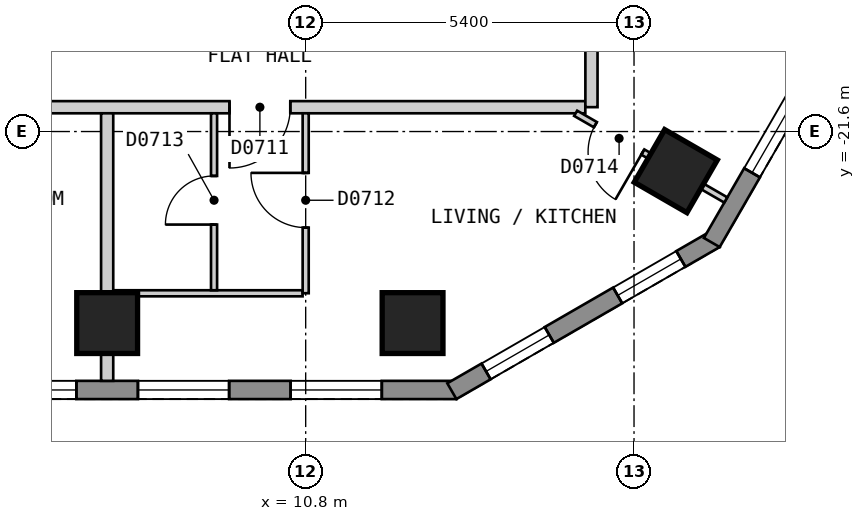
"""IFC4 building model, lengths in metres.
Left out: names, types, materials, properties, quantities, classifications, styles, units other than length and angle.
Written with IfcOpenShell. Run it as: python <this file> out.ifc"""

import sys

from ifc_helpers import new_model, si_unit, direction, frame, frame_2d, origin, origin_2d, place, context, subcontext, project, spatial, polyline, rectangle, outline, extrude, element, fill, save


model = new_model("IFC4")
c1 = context("Model", 3, precision=1e-05, world=origin(), true_north=direction((0.0, 1.0)))
c2 = subcontext(c1, "Body", "Model", "MODEL_VIEW")
j1 = project(units=[si_unit("LENGTHUNIT", "METRE"), si_unit("PLANEANGLEUNIT", "RADIAN")], contexts=[c1])
p1 = place(None, origin())
s1 = spatial("IfcSite", under=j1, at=p1, CompositionType="ELEMENT")
p2 = place(p1, origin())
s2 = spatial("IfcBuilding", under=s1, at=p2, CompositionType="ELEMENT")
p3 = place(p2, frame((0.0, 0.0, 93.0)))
s3 = spatial("IfcBuildingStorey", under=s2, at=p3, CompositionType="ELEMENT", Elevation=93.0)
for number, where, z_axis, x_axis in (
    (1, (7.535, -24.75, 0.0), (0.0, 0.0, 1.0), (1.0, 0.0, 0.0)),
    (2, (12.558, -24.75, 0.0), (0.0, 0.0, 1.0), (1.0, 0.0, 0.0)),
    (3, (16.887, -22.251, 0.0), (0.0, 0.0, 1.0), (0.5, 0.866, 0.0)),
):
    element("IfcColumn", number, at=place(p3, frame(where, z_axis=z_axis, x_axis=x_axis)), inside=s3, PredefinedType="COLUMN", context=c2, shape_type="SweptSolid", body=[
        extrude(rectangle(XDim=1.0, YDim=1.0, at=origin_2d()), origin(), (0.0, 0.0, 1.0), 3.0),
    ])
p4 = place(p3, frame((-13.279, -25.85, 0.0), z_axis=(0.0, 0.0, 1.0), x_axis=(1.0, 0.0, 0.0)))
e4 = element("IfcWall", 4, at=p4, inside=s3, PredefinedType="SOLIDWALL", context=c2, shape_type="SweptSolid", body=[
    extrude(outline(polyline([(0.0, -0.15), (26.558, -0.15), (26.478, 0.15), (0.08, 0.15), (0.0, -0.15)])), origin(), (0.0, 0.0, 1.0), 2.7),
])
p5 = place(p4, frame((1.228, 0.0, 0.15)))
e5 = element("IfcOpeningElement", 5, at=p5, cuts=e4, PredefinedType="OPENING", context=c2, shape_type="SweptSolid", body=[
    extrude(rectangle(XDim=1.5, YDim=2.1, at=frame_2d((0.75, 1.05))), frame((0.0, 0.16, 0.0), z_axis=(0.0, -1.0, 0.0), x_axis=(1.0, 0.0, 0.0)), (0.0, 0.0, 1.0), 0.32),
])
p6 = place(p4, frame((3.739, 0.0, 0.15)))
e6 = element("IfcOpeningElement", 6, at=p6, cuts=e4, PredefinedType="OPENING", context=c2, shape_type="SweptSolid", body=[
    extrude(rectangle(XDim=1.5, YDim=2.1, at=frame_2d((0.75, 1.05))), frame((0.0, 0.16, 0.0), z_axis=(0.0, -1.0, 0.0), x_axis=(1.0, 0.0, 0.0)), (0.0, 0.0, 1.0), 0.32),
])
p7 = place(p4, frame((6.251, 0.0, 0.15)))
e7 = element("IfcOpeningElement", 7, at=p7, cuts=e4, PredefinedType="OPENING", context=c2, shape_type="SweptSolid", body=[
    extrude(rectangle(XDim=1.5, YDim=2.1, at=frame_2d((0.75, 1.05))), frame((0.0, 0.16, 0.0), z_axis=(0.0, -1.0, 0.0), x_axis=(1.0, 0.0, 0.0)), (0.0, 0.0, 1.0), 0.32),
])
p8 = place(p4, frame((8.762, 0.0, 0.15)))
e8 = element("IfcOpeningElement", 8, at=p8, cuts=e4, PredefinedType="OPENING", context=c2, shape_type="SweptSolid", body=[
    extrude(rectangle(XDim=1.5, YDim=2.1, at=frame_2d((0.75, 1.05))), frame((0.0, 0.16, 0.0), z_axis=(0.0, -1.0, 0.0), x_axis=(1.0, 0.0, 0.0)), (0.0, 0.0, 1.0), 0.32),
])
p9 = place(p4, frame((11.274, 0.0, 0.15)))
e9 = element("IfcOpeningElement", 9, at=p9, cuts=e4, PredefinedType="OPENING", context=c2, shape_type="SweptSolid", body=[
    extrude(rectangle(XDim=1.5, YDim=2.1, at=frame_2d((0.75, 1.05))), frame((0.0, 0.16, 0.0), z_axis=(0.0, -1.0, 0.0), x_axis=(1.0, 0.0, 0.0)), (0.0, 0.0, 1.0), 0.32),
])
p10 = place(p4, frame((13.785, 0.0, 0.15)))
e10 = element("IfcOpeningElement", 10, at=p10, cuts=e4, PredefinedType="OPENING", context=c2, shape_type="SweptSolid", body=[
    extrude(rectangle(XDim=1.5, YDim=2.1, at=frame_2d((0.75, 1.05))), frame((0.0, 0.16, 0.0), z_axis=(0.0, -1.0, 0.0), x_axis=(1.0, 0.0, 0.0)), (0.0, 0.0, 1.0), 0.32),
])
p11 = place(p4, frame((16.297, 0.0, 0.15)))
e11 = element("IfcOpeningElement", 11, at=p11, cuts=e4, PredefinedType="OPENING", context=c2, shape_type="SweptSolid", body=[
    extrude(rectangle(XDim=1.5, YDim=2.1, at=frame_2d((0.75, 1.05))), frame((0.0, 0.16, 0.0), z_axis=(0.0, -1.0, 0.0), x_axis=(1.0, 0.0, 0.0)), (0.0, 0.0, 1.0), 0.32),
])
p12 = place(p4, frame((18.808, 0.0, 0.15)))
e12 = element("IfcOpeningElement", 12, at=p12, cuts=e4, PredefinedType="OPENING", context=c2, shape_type="SweptSolid", body=[
    extrude(rectangle(XDim=1.5, YDim=2.1, at=frame_2d((0.75, 1.05))), frame((0.0, 0.16, 0.0), z_axis=(0.0, -1.0, 0.0), x_axis=(1.0, 0.0, 0.0)), (0.0, 0.0, 1.0), 0.32),
])
p13 = place(p4, frame((21.32, 0.0, 0.15)))
e13 = element("IfcOpeningElement", 13, at=p13, cuts=e4, PredefinedType="OPENING", context=c2, shape_type="SweptSolid", body=[
    extrude(rectangle(XDim=1.5, YDim=2.1, at=frame_2d((0.75, 1.05))), frame((0.0, 0.16, 0.0), z_axis=(0.0, -1.0, 0.0), x_axis=(1.0, 0.0, 0.0)), (0.0, 0.0, 1.0), 0.32),
])
p14 = place(p4, frame((23.831, 0.0, 0.15)))
e14 = element("IfcOpeningElement", 14, at=p14, cuts=e4, PredefinedType="OPENING", context=c2, shape_type="SweptSolid", body=[
    extrude(rectangle(XDim=1.5, YDim=2.1, at=frame_2d((0.75, 1.05))), frame((0.0, 0.16, 0.0), z_axis=(0.0, -1.0, 0.0), x_axis=(1.0, 0.0, 0.0)), (0.0, 0.0, 1.0), 0.32),
])
p15 = place(p3, frame((13.204, -25.87, 0.0), z_axis=(0.0, 0.0, 1.0), x_axis=(0.866010750942, 0.50002537861, 0.0)))
e15 = element("IfcWall", 15, at=p15, inside=s3, PredefinedType="SOLIDWALL", context=c2, shape_type="SweptSolid", body=[
    extrude(outline(polyline([(0.0, -0.15), (5.0, -0.15), (4.919, 0.15), (0.08, 0.15), (0.0, -0.15)])), origin(), (0.0, 0.0, 1.0), 2.7),
])
p16 = place(p15, frame((0.65, 0.0, 0.15)))
e16 = element("IfcOpeningElement", 16, at=p16, cuts=e15, PredefinedType="OPENING", context=c2, shape_type="SweptSolid", body=[
    extrude(rectangle(XDim=1.2, YDim=2.1, at=frame_2d((0.6, 1.05))), frame((0.0, 0.16, 0.0), z_axis=(0.0, -1.0, 0.0), x_axis=(1.0, 0.0, 0.0)), (0.0, 0.0, 1.0), 0.32),
])
p17 = place(p15, frame((3.149, 0.0, 0.15)))
e17 = element("IfcOpeningElement", 17, at=p17, cuts=e15, PredefinedType="OPENING", context=c2, shape_type="SweptSolid", body=[
    extrude(rectangle(XDim=1.2, YDim=2.1, at=frame_2d((0.6, 1.05))), frame((0.0, 0.16, 0.0), z_axis=(0.0, -1.0, 0.0), x_axis=(1.0, 0.0, 0.0)), (0.0, 0.0, 1.0), 0.32),
])
p18 = place(p3, frame((17.479, -23.425, 0.0), z_axis=(0.0, 0.0, 1.0), x_axis=(0.500035407905, 0.866004960056, 0.0)))
e18 = element("IfcWall", 18, at=p18, inside=s3, PredefinedType="SOLIDWALL", context=c2, shape_type="SweptSolid", body=[
    extrude(outline(polyline([(0.0, -0.15), (23.094, -0.15), (23.014, 0.15), (0.08, 0.15), (0.0, -0.15)])), origin(), (0.0, 0.0, 1.0), 2.7),
])
p19 = place(p18, frame((1.324, 0.0, 0.15)))
e19 = element("IfcOpeningElement", 19, at=p19, cuts=e18, PredefinedType="OPENING", context=c2, shape_type="SweptSolid", body=[
    extrude(rectangle(XDim=1.5, YDim=2.1, at=frame_2d((0.75, 1.05))), frame((0.0, 0.16, 0.0), z_axis=(0.0, -1.0, 0.0), x_axis=(1.0, 0.0, 0.0)), (0.0, 0.0, 1.0), 0.32),
])
p20 = place(p18, frame((4.031, 0.0, 0.15)))
e20 = element("IfcOpeningElement", 20, at=p20, cuts=e18, PredefinedType="OPENING", context=c2, shape_type="SweptSolid", body=[
    extrude(rectangle(XDim=1.5, YDim=2.1, at=frame_2d((0.75, 1.05))), frame((0.0, 0.16, 0.0), z_axis=(0.0, -1.0, 0.0), x_axis=(1.0, 0.0, 0.0)), (0.0, 0.0, 1.0), 0.32),
])
p21 = place(p18, frame((6.737, 0.0, 0.15)))
e21 = element("IfcOpeningElement", 21, at=p21, cuts=e18, PredefinedType="OPENING", context=c2, shape_type="SweptSolid", body=[
    extrude(rectangle(XDim=1.5, YDim=2.1, at=frame_2d((0.75, 1.05))), frame((0.0, 0.16, 0.0), z_axis=(0.0, -1.0, 0.0), x_axis=(1.0, 0.0, 0.0)), (0.0, 0.0, 1.0), 0.32),
])
p22 = place(p18, frame((9.444, 0.0, 0.15)))
e22 = element("IfcOpeningElement", 22, at=p22, cuts=e18, PredefinedType="OPENING", context=c2, shape_type="SweptSolid", body=[
    extrude(rectangle(XDim=1.5, YDim=2.1, at=frame_2d((0.75, 1.05))), frame((0.0, 0.16, 0.0), z_axis=(0.0, -1.0, 0.0), x_axis=(1.0, 0.0, 0.0)), (0.0, 0.0, 1.0), 0.32),
])
p23 = place(p18, frame((12.151, 0.0, 0.15)))
e23 = element("IfcOpeningElement", 23, at=p23, cuts=e18, PredefinedType="OPENING", context=c2, shape_type="SweptSolid", body=[
    extrude(rectangle(XDim=1.5, YDim=2.1, at=frame_2d((0.75, 1.05))), frame((0.0, 0.16, 0.0), z_axis=(0.0, -1.0, 0.0), x_axis=(1.0, 0.0, 0.0)), (0.0, 0.0, 1.0), 0.32),
])
p24 = place(p18, frame((14.857, 0.0, 0.15)))
e24 = element("IfcOpeningElement", 24, at=p24, cuts=e18, PredefinedType="OPENING", context=c2, shape_type="SweptSolid", body=[
    extrude(rectangle(XDim=1.5, YDim=2.1, at=frame_2d((0.75, 1.05))), frame((0.0, 0.16, 0.0), z_axis=(0.0, -1.0, 0.0), x_axis=(1.0, 0.0, 0.0)), (0.0, 0.0, 1.0), 0.32),
])
p25 = place(p18, frame((17.564, 0.0, 0.15)))
e25 = element("IfcOpeningElement", 25, at=p25, cuts=e18, PredefinedType="OPENING", context=c2, shape_type="SweptSolid", body=[
    extrude(rectangle(XDim=1.5, YDim=2.1, at=frame_2d((0.75, 1.05))), frame((0.0, 0.16, 0.0), z_axis=(0.0, -1.0, 0.0), x_axis=(1.0, 0.0, 0.0)), (0.0, 0.0, 1.0), 0.32),
])
p26 = place(p18, frame((20.271, 0.0, 0.15)))
e26 = element("IfcOpeningElement", 26, at=p26, cuts=e18, PredefinedType="OPENING", context=c2, shape_type="SweptSolid", body=[
    extrude(rectangle(XDim=1.5, YDim=2.1, at=frame_2d((0.75, 1.05))), frame((0.0, 0.16, 0.0), z_axis=(0.0, -1.0, 0.0), x_axis=(1.0, 0.0, 0.0)), (0.0, 0.0, 1.0), 0.32),
])
p27 = place(p3, frame((-15.499, -21.2, 0.0), z_axis=(0.0, 0.0, 1.0), x_axis=(1.0, 0.0, 0.0)))
e27 = element("IfcWall", 27, at=p27, inside=s3, PredefinedType="PARTITIONING", context=c2, shape_type="SweptSolid", body=[
    extrude(rectangle(XDim=30.898, YDim=0.2, at=frame_2d((15.449, 0.0))), origin(), (0.0, 0.0, 1.0), 2.7),
])
p28 = place(p27, frame((9.977, 0.0, 0.0)))
e28 = element("IfcOpeningElement", 28, at=p28, cuts=e27, PredefinedType="OPENING", context=c2, shape_type="SweptSolid", body=[
    extrude(rectangle(XDim=1.0, YDim=2.1, at=frame_2d((0.5, 1.05))), frame((0.0, 0.11, 0.0), z_axis=(0.0, -1.0, 0.0), x_axis=(1.0, 0.0, 0.0)), (0.0, 0.0, 1.0), 0.22),
])
p29 = place(p27, frame((25.046, 0.0, 0.0)))
e29 = element("IfcOpeningElement", 29, at=p29, cuts=e27, PredefinedType="OPENING", context=c2, shape_type="SweptSolid", body=[
    extrude(rectangle(XDim=1.0, YDim=2.1, at=frame_2d((0.5, 1.05))), frame((0.0, 0.11, 0.0), z_axis=(0.0, -1.0, 0.0), x_axis=(1.0, 0.0, 0.0)), (0.0, 0.0, 1.0), 0.22),
])
p30 = place(p3, frame((15.5, -21.199, 0.0), z_axis=(0.0, 0.0, 1.0), x_axis=(0.0, 1.0, 0.0)))
e30 = element("IfcWall", 30, at=p30, inside=s3, PredefinedType="PARTITIONING", context=c2, shape_type="SweptSolid", body=[
    extrude(rectangle(XDim=10.483, YDim=0.2, at=frame_2d((5.241, 0.0))), origin(), (0.0, 0.0, 1.0), 2.7),
])
p31 = place(p3, frame((15.24, -21.3, 0.0), z_axis=(0.0, 0.0, 1.0), x_axis=(0.866090043625, -0.499888023795, 0.0)))
e31 = element("IfcWall", 31, at=p31, inside=s3, PredefinedType="PARTITIONING", context=c2, shape_type="SweptSolid", body=[
    extrude(rectangle(XDim=2.851, YDim=0.1, at=frame_2d((1.425, 0.0))), origin(), (0.0, 0.0, 1.0), 2.7),
])
p32 = place(p31, frame((0.375, 0.0, 0.0)))
e32 = element("IfcOpeningElement", 32, at=p32, cuts=e31, PredefinedType="OPENING", context=c2, shape_type="SweptSolid", body=[
    extrude(rectangle(XDim=0.9, YDim=2.1, at=frame_2d((0.45, 1.05))), frame((0.0, 0.06, 0.0), z_axis=(0.0, -1.0, 0.0), x_axis=(1.0, 0.0, 0.0)), (0.0, 0.0, 1.0), 0.12),
])
p33 = place(p3, frame((7.635, -24.26, 0.0), z_axis=(0.0, 0.0, 1.0), x_axis=(1.0, 0.0, 0.0)))
e33 = element("IfcWall", 33, at=p33, inside=s3, PredefinedType="PARTITIONING", context=c2, shape_type="SweptSolid", body=[
    extrude(rectangle(XDim=3.114, YDim=0.1, at=frame_2d((1.557, 0.0))), origin(), (0.0, 0.0, 1.0), 2.7),
])
p34 = place(p3, frame((9.293, -24.21, 0.0), z_axis=(0.0, 0.0, 1.0), x_axis=(0.0, 1.0, 0.0)))
e34 = element("IfcWall", 34, at=p34, inside=s3, PredefinedType="PARTITIONING", context=c2, shape_type="SweptSolid", body=[
    extrude(rectangle(XDim=2.91, YDim=0.1, at=frame_2d((1.455, 0.0))), origin(), (0.0, 0.0, 1.0), 2.7),
])
p35 = place(p34, frame((1.08, 0.0, 0.0)))
e35 = element("IfcOpeningElement", 35, at=p35, cuts=e34, PredefinedType="OPENING", context=c2, shape_type="SweptSolid", body=[
    extrude(rectangle(XDim=0.8, YDim=2.1, at=frame_2d((0.4, 1.05))), frame((0.0, 0.06, 0.0), z_axis=(0.0, -1.0, 0.0), x_axis=(1.0, 0.0, 0.0)), (0.0, 0.0, 1.0), 0.12),
])
p36 = place(p3, frame((10.8, -24.259, 0.0), z_axis=(0.0, 0.0, 1.0), x_axis=(0.0, 1.0, 0.0)))
e36 = element("IfcWall", 36, at=p36, inside=s3, PredefinedType="PARTITIONING", context=c2, shape_type="SweptSolid", body=[
    extrude(rectangle(XDim=2.959, YDim=0.1, at=frame_2d((1.479, 0.0))), origin(), (0.0, 0.0, 1.0), 2.7),
])
p37 = place(p36, frame((1.079, 0.0, 0.0)))
e37 = element("IfcOpeningElement", 37, at=p37, cuts=e36, PredefinedType="OPENING", context=c2, shape_type="SweptSolid", body=[
    extrude(rectangle(XDim=0.9, YDim=2.1, at=frame_2d((0.45, 1.05))), frame((0.0, 0.06, 0.0), z_axis=(0.0, -1.0, 0.0), x_axis=(1.0, 0.0, 0.0)), (0.0, 0.0, 1.0), 0.12),
])
p38 = place(p3, frame((7.535, -21.3, 0.0), z_axis=(0.0, 0.0, 1.0), x_axis=(0.0, -1.0, 0.0)))
e38 = element("IfcWall", 38, at=p38, inside=s3, PredefinedType="PARTITIONING", context=c2, shape_type="SweptSolid", body=[
    extrude(rectangle(XDim=2.98, YDim=0.2, at=frame_2d((1.49, 0.0))), origin(), (0.0, 0.0, 1.0), 2.7),
])
p39 = place(p3, frame((7.535, -25.7, 0.0), z_axis=(0.0, 0.0, 1.0), x_axis=(0.0, 1.0, 0.0)))
e39 = element("IfcWall", 39, at=p39, inside=s3, PredefinedType="PARTITIONING", context=c2, shape_type="SweptSolid", body=[
    extrude(rectangle(XDim=1.46, YDim=0.2, at=frame_2d((0.73, 0.0))), origin(), (0.0, 0.0, 1.0), 2.7),
])
p40 = place(p12, origin())
e40 = element("IfcWindow", 40, at=p40, inside=s3, PartitioningType="SINGLE_PANEL", PredefinedType="WINDOW", context=c2, shape_type="SweptSolid", body=[
    extrude(rectangle(XDim=1.5, YDim=2.1, at=frame_2d((0.75, 1.05))), frame((0.0, 0.03, 0.0), z_axis=(0.0, -1.0, 0.0), x_axis=(1.0, 0.0, 0.0)), (0.0, 0.0, 1.0), 0.06),
])
fill(e12, e40)
p41 = place(p13, origin())
e41 = element("IfcWindow", 41, at=p41, inside=s3, PartitioningType="SINGLE_PANEL", PredefinedType="WINDOW", context=c2, shape_type="SweptSolid", body=[
    extrude(rectangle(XDim=1.5, YDim=2.1, at=frame_2d((0.75, 1.05))), frame((0.0, 0.03, 0.0), z_axis=(0.0, -1.0, 0.0), x_axis=(1.0, 0.0, 0.0)), (0.0, 0.0, 1.0), 0.06),
])
fill(e13, e41)
p42 = place(p14, origin())
e42 = element("IfcWindow", 42, at=p42, inside=s3, PartitioningType="SINGLE_PANEL", PredefinedType="WINDOW", context=c2, shape_type="SweptSolid", body=[
    extrude(rectangle(XDim=1.5, YDim=2.1, at=frame_2d((0.75, 1.05))), frame((0.0, 0.03, 0.0), z_axis=(0.0, -1.0, 0.0), x_axis=(1.0, 0.0, 0.0)), (0.0, 0.0, 1.0), 0.06),
])
fill(e14, e42)
p43 = place(p16, origin())
e43 = element("IfcWindow", 43, at=p43, inside=s3, PartitioningType="SINGLE_PANEL", PredefinedType="WINDOW", context=c2, shape_type="SweptSolid", body=[
    extrude(rectangle(XDim=1.2, YDim=2.1, at=frame_2d((0.6, 1.05))), frame((0.0, 0.03, 0.0), z_axis=(0.0, -1.0, 0.0), x_axis=(1.0, 0.0, 0.0)), (0.0, 0.0, 1.0), 0.06),
])
fill(e16, e43)
p44 = place(p17, origin())
e44 = element("IfcWindow", 44, at=p44, inside=s3, PartitioningType="SINGLE_PANEL", PredefinedType="WINDOW", context=c2, shape_type="SweptSolid", body=[
    extrude(rectangle(XDim=1.2, YDim=2.1, at=frame_2d((0.6, 1.05))), frame((0.0, 0.03, 0.0), z_axis=(0.0, -1.0, 0.0), x_axis=(1.0, 0.0, 0.0)), (0.0, 0.0, 1.0), 0.06),
])
fill(e17, e44)
p45 = place(p19, origin())
e45 = element("IfcWindow", 45, at=p45, inside=s3, PartitioningType="SINGLE_PANEL", PredefinedType="WINDOW", context=c2, shape_type="SweptSolid", body=[
    extrude(rectangle(XDim=1.5, YDim=2.1, at=frame_2d((0.75, 1.05))), frame((0.0, 0.03, 0.0), z_axis=(0.0, -1.0, 0.0), x_axis=(1.0, 0.0, 0.0)), (0.0, 0.0, 1.0), 0.06),
])
fill(e19, e45)
p46 = place(p29, origin())
e46 = element("IfcDoor", 46, at=p46, inside=s3, OperationType="SINGLE_SWING_LEFT", PredefinedType="DOOR", context=c2, shape_type="SweptSolid", body=[
    extrude(rectangle(XDim=1.0, YDim=2.1, at=frame_2d((0.5, 1.05))), frame((0.0, 0.025, 0.0), z_axis=(0.0, -1.0, 0.0), x_axis=(1.0, 0.0, 0.0)), (0.0, 0.0, 1.0), 0.05),
])
fill(e29, e46)
p47 = place(p37, origin())
e47 = element("IfcDoor", 47, at=p47, inside=s3, OperationType="SINGLE_SWING_RIGHT", PredefinedType="DOOR", context=c2, shape_type="SweptSolid", body=[
    extrude(rectangle(XDim=0.9, YDim=2.1, at=frame_2d((0.45, 1.05))), frame((0.0, 0.025, 0.0), z_axis=(0.0, -1.0, 0.0), x_axis=(1.0, 0.0, 0.0)), (0.0, 0.0, 1.0), 0.05),
])
fill(e37, e47)
p48 = place(p35, origin())
e48 = element("IfcDoor", 48, at=p48, inside=s3, OperationType="SINGLE_SWING_LEFT", PredefinedType="DOOR", context=c2, shape_type="SweptSolid", body=[
    extrude(rectangle(XDim=0.8, YDim=2.1, at=frame_2d((0.4, 1.05))), frame((0.0, 0.025, 0.0), z_axis=(0.0, -1.0, 0.0), x_axis=(1.0, 0.0, 0.0)), (0.0, 0.0, 1.0), 0.05),
])
fill(e35, e48)
p49 = place(p32, origin())
e49 = element("IfcDoor", 49, at=p49, inside=s3, OperationType="SINGLE_SWING_RIGHT", PredefinedType="DOOR", context=c2, shape_type="SweptSolid", body=[
    extrude(rectangle(XDim=0.9, YDim=2.1, at=frame_2d((0.45, 1.05))), frame((0.0, 0.025, 0.0), z_axis=(0.0, -1.0, 0.0), x_axis=(1.0, 0.0, 0.0)), (0.0, 0.0, 1.0), 0.05),
])
fill(e32, e49)
save(model, sys.argv[1])
